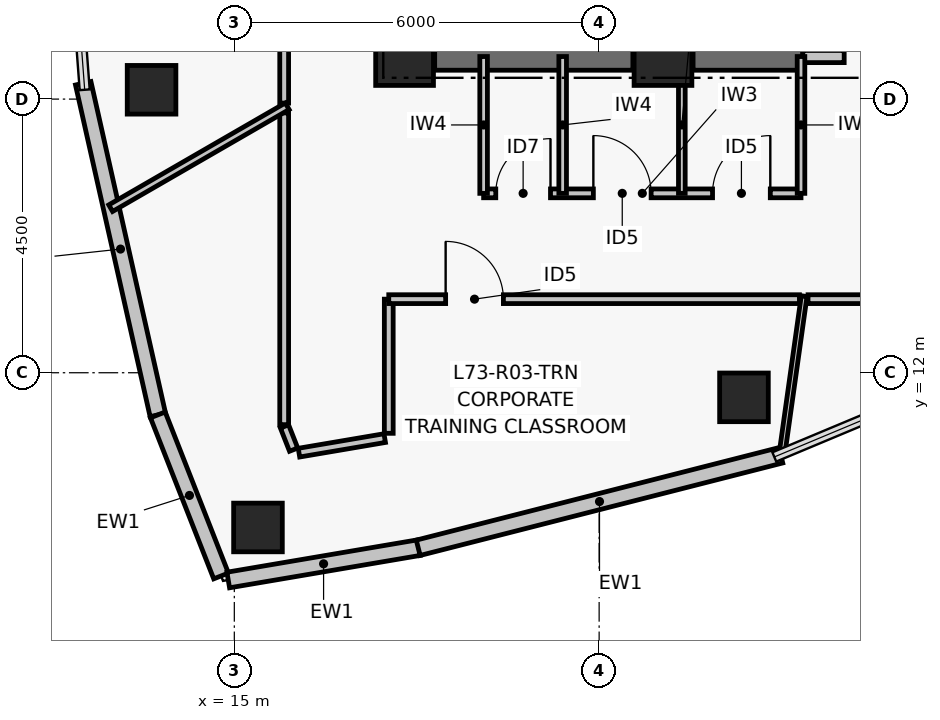
"""IFC4 building model, lengths in metres.
Left out: names, types, materials, properties, quantities, classifications, styles, units other than length and angle.
Written with IfcOpenShell. Run it as: python <this file> out.ifc"""

import sys

from ifc_helpers import new_model, si_unit, direction, frame, frame_2d, origin, origin_2d, place, context, subcontext, project, spatial, rectangle, hollow_rectangle, extrude, element, fill, save


model = new_model("IFC4")
c1 = context("Model", 3, precision=1e-05, world=origin(), true_north=direction((0.0, 1.0)))
c2 = subcontext(c1, "Body", "Model", "MODEL_VIEW")
j1 = project(units=[si_unit("LENGTHUNIT", "METRE"), si_unit("PLANEANGLEUNIT", "RADIAN")], contexts=[c1])
p1 = place(None, origin())
s1 = spatial("IfcSite", under=j1, at=p1, CompositionType="ELEMENT")
p2 = place(p1, origin())
s2 = spatial("IfcBuilding", under=s1, at=p2, CompositionType="ELEMENT")
p3 = place(p2, frame((0.0, 0.0, 288.06)))
s3 = spatial("IfcBuildingStorey", under=s2, at=p3, CompositionType="ELEMENT", Elevation=288.06)
for number, where, z_axis, x_axis in (
    (1, (17.8, 17.2, 0.0), (0.0, 0.0, 1.0), (1.0, 0.0, 0.0)),
    (2, (22.05, 17.2, 0.0), (0.0, 0.0, 1.0), (1.0, 0.0, 0.0)),
):
    element("IfcColumn", number, at=place(p3, frame(where, z_axis=z_axis, x_axis=x_axis)), inside=s3, PredefinedType="COLUMN", context=c2, shape_type="SweptSolid", body=[
        extrude(rectangle(XDim=0.95, YDim=0.95, at=origin_2d()), origin(), (0.0, 0.0, 1.0), 3.72),
    ])
p4 = place(p3, frame((18.295, 17.2, 0.0), z_axis=(0.0, 0.0, 1.0), x_axis=(1.0, 0.0, 0.0)))
e3 = element("IfcWall", 3, at=p4, inside=s3, PredefinedType="SHEAR", context=c2, shape_type="SweptSolid", body=[
    extrude(rectangle(XDim=3.26, YDim=0.45, at=frame_2d((1.63, 0.0))), origin(), (0.0, 0.0, 1.0), 3.5),
])
p5 = place(p3, frame((22.545, 17.2, 0.0), z_axis=(0.0, 0.0, 1.0), x_axis=(1.0, 0.0, 0.0)))
e4 = element("IfcWall", 4, at=p5, inside=s3, PredefinedType="SHEAR", context=c2, shape_type="SweptSolid", body=[
    extrude(rectangle(XDim=1.805, YDim=0.45, at=frame_2d((0.903, 0.0))), origin(), (0.0, 0.0, 1.0), 3.5),
])
for number, where, z_axis, x_axis in (
    (5, (13.639, 16.653, 0.0), (0.0, 0.0, 1.0), (1.0, 0.0, 0.0)),
    (6, (15.389, 9.455, 0.0), (0.0, 0.0, 1.0), (1.0, 0.0, 0.0)),
    (7, (23.382, 11.595, 0.0), (0.0, 0.0, 1.0), (1.0, 0.0, 0.0)),
):
    element("IfcColumn", number, at=place(p3, frame(where, z_axis=z_axis, x_axis=x_axis)), inside=s3, PredefinedType="COLUMN", context=c2, shape_type="SweptSolid", body=[
        extrude(hollow_rectangle(XDim=0.8, YDim=0.8, WallThickness=0.035, at=origin_2d()), origin(), (0.0, 0.0, 1.0), 3.72),
    ])
p6 = place(p3, frame((13.742, 11.307, 0.0), z_axis=(0.0, 0.0, 1.0), x_axis=(-0.219500763731, 0.97561232809, 0.0)))
e8 = element("IfcWall", 8, at=p6, inside=s3, PredefinedType="PARTITIONING", context=c2, shape_type="SweptSolid", body=[
    extrude(rectangle(XDim=5.59, YDim=0.26, at=frame_2d((2.795, 0.0))), origin(), (0.0, 0.0, 1.0), 3.5),
])
p7 = place(p3, frame((14.782, 8.658, 0.0), z_axis=(0.0, 0.0, 1.0), x_axis=(-0.36559927932, 0.930772349697, 0.0)))
e9 = element("IfcWall", 9, at=p7, inside=s3, PredefinedType="PARTITIONING", context=c2, shape_type="SweptSolid", body=[
    extrude(rectangle(XDim=2.845, YDim=0.26, at=frame_2d((1.423, 0.0))), origin(), (0.0, 0.0, 1.0), 3.5),
])
p8 = place(p3, frame((18.036, 9.124, 0.0), z_axis=(0.0, 0.0, 1.0), x_axis=(-0.985889432766, -0.167397808709, 0.0)))
e10 = element("IfcWall", 10, at=p8, inside=s3, PredefinedType="PARTITIONING", context=c2, shape_type="SweptSolid", body=[
    extrude(rectangle(XDim=3.181, YDim=0.26, at=frame_2d((1.59, 0.0))), origin(), (0.0, 0.0, 1.0), 3.5),
])
p9 = place(p3, frame((23.988, 10.642, 0.0), z_axis=(0.0, 0.0, 1.0), x_axis=(-0.968988278672, -0.247106689096, 0.0)))
e11 = element("IfcWall", 11, at=p9, inside=s3, PredefinedType="PARTITIONING", context=c2, shape_type="SweptSolid", body=[
    extrude(rectangle(XDim=6.154, YDim=0.26, at=frame_2d((3.077, 0.0))), origin(), (0.0, 0.0, 1.0), 3.5),
])
p10 = place(p3, frame((24.35, 17.2, 0.0), z_axis=(0.0, 0.0, 1.0), x_axis=(1.0, 0.0, 0.0)))
e12 = element("IfcWall", 12, at=p10, inside=s3, PredefinedType="PARTITIONING", context=c2, shape_type="SweptSolid", body=[
    extrude(rectangle(XDim=2.5, YDim=0.2, at=frame_2d((1.25, 0.0))), origin(), (0.0, 0.0, 1.0), 2.63),
])
p11 = place(p10, frame((0.68, 0.0, 0.0)))
e13 = element("IfcOpeningElement", 13, at=p11, cuts=e12, PredefinedType="OPENING", context=c2, shape_type="SweptSolid", body=[
    extrude(rectangle(XDim=1.15, YDim=2.08, at=frame_2d((0.575, 1.04))), frame((0.0, 0.11, 0.0), z_axis=(0.0, -1.0, 0.0), x_axis=(1.0, 0.0, 0.0)), (0.0, 0.0, 1.0), 0.22),
])
p12 = place(p3, frame((19.1, 14.95, 0.0), z_axis=(0.0, 0.0, 1.0), x_axis=(1.0, 0.0, 0.0)))
e14 = element("IfcWall", 14, at=p12, inside=s3, PredefinedType="PARTITIONING", context=c2, shape_type="SweptSolid", body=[
    extrude(rectangle(XDim=5.22, YDim=0.145, at=frame_2d((2.61, 0.0))), origin(), (0.0, 0.0, 1.0), 2.83),
])
p13 = place(p12, frame((0.2, 0.0, 0.0)))
e15 = element("IfcOpeningElement", 15, at=p13, cuts=e14, PredefinedType="OPENING", context=c2, shape_type="SweptSolid", body=[
    extrude(rectangle(XDim=0.9, YDim=2.02, at=frame_2d((0.45, 1.01))), frame((0.0, 0.083, 0.0), z_axis=(0.0, -1.0, 0.0), x_axis=(1.0, 0.0, 0.0)), (0.0, 0.0, 1.0), 0.165),
])
p14 = place(p12, frame((1.805, 0.0, 0.0)))
e16 = element("IfcOpeningElement", 16, at=p14, cuts=e14, PredefinedType="OPENING", context=c2, shape_type="SweptSolid", body=[
    extrude(rectangle(XDim=0.95, YDim=2.06, at=frame_2d((0.475, 1.03))), frame((0.0, 0.083, 0.0), z_axis=(0.0, -1.0, 0.0), x_axis=(1.0, 0.0, 0.0)), (0.0, 0.0, 1.0), 0.165),
])
p15 = place(p12, frame((3.765, 0.0, 0.0)))
e17 = element("IfcOpeningElement", 17, at=p15, cuts=e14, PredefinedType="OPENING", context=c2, shape_type="SweptSolid", body=[
    extrude(rectangle(XDim=0.95, YDim=2.06, at=frame_2d((0.475, 1.03))), frame((0.0, 0.083, 0.0), z_axis=(0.0, -1.0, 0.0), x_axis=(1.0, 0.0, 0.0)), (0.0, 0.0, 1.0), 0.165),
])
for number, where, z_axis, x_axis in (
    (18, (19.1, 14.95, 0.0), (0.0, 0.0, 1.0), (0.0, 1.0, 0.0)),
    (19, (20.4, 14.95, 0.0), (0.0, 0.0, 1.0), (0.0, 1.0, 0.0)),
):
    element("IfcWall", number, at=place(p3, frame(where, z_axis=z_axis, x_axis=x_axis)), inside=s3, PredefinedType="PARTITIONING", context=c2, shape_type="SweptSolid", body=[
        extrude(rectangle(XDim=2.25, YDim=0.125, at=frame_2d((1.125, 0.0))), origin(), (0.0, 0.0, 1.0), 2.63),
    ])
p16 = place(p3, frame((22.36, 14.95, 0.0), z_axis=(0.0, 0.0, 1.0), x_axis=(0.0, 1.0, 0.0)))
e20 = element("IfcWall", 20, at=p16, inside=s3, PredefinedType="PARTITIONING", context=c2, shape_type="SweptSolid", body=[
    extrude(rectangle(XDim=2.25, YDim=0.11, at=frame_2d((1.125, 0.0))), origin(), (0.0, 0.0, 1.0), 2.63),
])
p17 = place(p3, frame((24.32, 14.95, 0.0), z_axis=(0.0, 0.0, 1.0), x_axis=(0.0, 1.0, 0.0)))
e21 = element("IfcWall", 21, at=p17, inside=s3, PredefinedType="PARTITIONING", context=c2, shape_type="SweptSolid", body=[
    extrude(rectangle(XDim=2.25, YDim=0.125, at=frame_2d((1.125, 0.0))), origin(), (0.0, 0.0, 1.0), 2.63),
])
p18 = place(p3, frame((15.82, 25.876, 0.0), z_axis=(0.0, 0.0, 1.0), x_axis=(0.0, -1.0, 0.0)))
e22 = element("IfcWall", 22, at=p18, inside=s3, PredefinedType="PARTITIONING", context=c2, shape_type="SweptSolid", body=[
    extrude(rectangle(XDim=9.442, YDim=0.145, at=frame_2d((4.721, 0.0))), origin(), (0.0, 0.0, 1.0), 2.83),
])
p19 = place(p18, frame((3.254, 0.0, 0.0)))
e23 = element("IfcOpeningElement", 23, at=p19, cuts=e22, PredefinedType="OPENING", context=c2, shape_type="SweptSolid", body=[
    extrude(rectangle(XDim=0.95, YDim=2.06, at=frame_2d((0.475, 1.03))), frame((0.0, 0.083, 0.0), z_axis=(0.0, -1.0, 0.0), x_axis=(1.0, 0.0, 0.0)), (0.0, 0.0, 1.0), 0.165),
])
p20 = place(p3, frame((15.82, 16.273, 0.0), z_axis=(0.0, 0.0, 1.0), x_axis=(0.0, -1.0, 0.0)))
e24 = element("IfcWall", 24, at=p20, inside=s3, PredefinedType="PARTITIONING", context=c2, shape_type="SweptSolid", body=[
    extrude(rectangle(XDim=5.126, YDim=0.145, at=frame_2d((2.563, 0.0))), origin(), (0.0, 0.0, 1.0), 2.83),
])
p21 = place(p3, frame((15.825, 11.117, 0.0), z_axis=(0.0, 0.0, 1.0), x_axis=(0.365633948196, -0.930758731319, 0.0)))
e25 = element("IfcWall", 25, at=p21, inside=s3, PredefinedType="PARTITIONING", context=c2, shape_type="SweptSolid", body=[
    extrude(rectangle(XDim=0.41, YDim=0.145, at=frame_2d((0.205, 0.0))), origin(), (0.0, 0.0, 1.0), 2.83),
])
p22 = place(p3, frame((16.063, 10.686, 0.0), z_axis=(0.0, 0.0, 1.0), x_axis=(0.985881780308, 0.167442871621, 0.0)))
e26 = element("IfcWall", 26, at=p22, inside=s3, PredefinedType="PARTITIONING", context=c2, shape_type="SweptSolid", body=[
    extrude(rectangle(XDim=1.43, YDim=0.145, at=frame_2d((0.715, 0.0))), origin(), (0.0, 0.0, 1.0), 3.13),
])
p23 = place(p3, frame((17.54, 11.004, 0.0), z_axis=(0.0, 0.0, 1.0), x_axis=(0.0, 1.0, 0.0)))
e27 = element("IfcWall", 27, at=p23, inside=s3, PredefinedType="PARTITIONING", context=c2, shape_type="SweptSolid", body=[
    extrude(rectangle(XDim=2.206, YDim=0.145, at=frame_2d((1.103, 0.0))), origin(), (0.0, 0.0, 1.0), 3.13),
])
p24 = place(p3, frame((17.54, 13.21, 0.0), z_axis=(0.0, 0.0, 1.0), x_axis=(1.0, 0.0, 0.0)))
e28 = element("IfcWall", 28, at=p24, inside=s3, PredefinedType="PARTITIONING", context=c2, shape_type="SweptSolid", body=[
    extrude(rectangle(XDim=6.754, YDim=0.145, at=frame_2d((3.377, 0.0))), origin(), (0.0, 0.0, 1.0), 2.83),
])
p25 = place(p24, frame((0.936, 0.0, 0.0)))
e29 = element("IfcOpeningElement", 29, at=p25, cuts=e28, PredefinedType="OPENING", context=c2, shape_type="SweptSolid", body=[
    extrude(rectangle(XDim=0.95, YDim=2.06, at=frame_2d((0.475, 1.03))), frame((0.0, 0.083, 0.0), z_axis=(0.0, -1.0, 0.0), x_axis=(1.0, 0.0, 0.0)), (0.0, 0.0, 1.0), 0.165),
])
p26 = place(p3, frame((24.435, 13.21, 0.0), z_axis=(0.0, 0.0, 1.0), x_axis=(1.0, 0.0, 0.0)))
e30 = element("IfcWall", 30, at=p26, inside=s3, PredefinedType="PARTITIONING", context=c2, shape_type="SweptSolid", body=[
    extrude(rectangle(XDim=4.675, YDim=0.145, at=frame_2d((2.337, 0.0))), origin(), (0.0, 0.0, 1.0), 2.98),
])
p27 = place(p26, frame((2.676, 0.0, 0.0)))
e31 = element("IfcOpeningElement", 31, at=p27, cuts=e30, PredefinedType="OPENING", context=c2, shape_type="SweptSolid", body=[
    extrude(rectangle(XDim=0.92, YDim=2.05, at=frame_2d((0.46, 1.025))), frame((0.0, 0.083, 0.0), z_axis=(0.0, -1.0, 0.0), x_axis=(1.0, 0.0, 0.0)), (0.0, 0.0, 1.0), 0.165),
])
p28 = place(p3, frame((15.87, 16.382, 0.0), z_axis=(0.0, 0.0, 1.0), x_axis=(-0.866052188221, -0.499953605124, 0.0)))
e32 = element("IfcWall", 32, at=p28, inside=s3, PredefinedType="PARTITIONING", context=c2, shape_type="SweptSolid", body=[
    extrude(rectangle(XDim=3.352, YDim=0.125, at=frame_2d((1.676, 0.0))), origin(), (0.0, 0.0, 1.0), 2.98),
])
p29 = place(p3, frame((24.372, 13.26, 0.0), z_axis=(0.0, 0.0, 1.0), x_axis=(-0.139185119823, -0.990266379526, 0.0)))
e33 = element("IfcWall", 33, at=p29, inside=s3, PredefinedType="PARTITIONING", context=c2, shape_type="SweptSolid", body=[
    extrude(rectangle(XDim=2.629, YDim=0.095, at=frame_2d((1.315, 0.0))), origin(), (0.0, 0.0, 1.0), 2.98),
])
p30 = place(p11, origin())
e34 = element("IfcDoor", 34, at=p30, inside=s3, OperationType="SINGLE_SWING_LEFT", PredefinedType="DOOR", context=c2, shape_type="SweptSolid", body=[
    extrude(rectangle(XDim=1.15, YDim=2.08, at=frame_2d((0.575, 1.04))), frame((0.0, 0.025, 0.0), z_axis=(0.0, -1.0, 0.0), x_axis=(1.0, 0.0, 0.0)), (0.0, 0.0, 1.0), 0.05),
])
fill(e13, e34)
p31 = place(p13, origin())
e35 = element("IfcDoor", 35, at=p31, inside=s3, OperationType="SINGLE_SWING_RIGHT", PredefinedType="DOOR", context=c2, shape_type="SweptSolid", body=[
    extrude(rectangle(XDim=0.9, YDim=2.02, at=frame_2d((0.45, 1.01))), frame((0.0, 0.025, 0.0), z_axis=(0.0, -1.0, 0.0), x_axis=(1.0, 0.0, 0.0)), (0.0, 0.0, 1.0), 0.05),
])
fill(e15, e35)
p32 = place(p14, origin())
e36 = element("IfcDoor", 36, at=p32, inside=s3, OperationType="SINGLE_SWING_LEFT", PredefinedType="DOOR", context=c2, shape_type="SweptSolid", body=[
    extrude(rectangle(XDim=0.95, YDim=2.06, at=frame_2d((0.475, 1.03))), frame((0.0, 0.025, 0.0), z_axis=(0.0, -1.0, 0.0), x_axis=(1.0, 0.0, 0.0)), (0.0, 0.0, 1.0), 0.05),
])
fill(e16, e36)
p33 = place(p15, origin())
e37 = element("IfcDoor", 37, at=p33, inside=s3, OperationType="SINGLE_SWING_RIGHT", PredefinedType="DOOR", context=c2, shape_type="SweptSolid", body=[
    extrude(rectangle(XDim=0.95, YDim=2.06, at=frame_2d((0.475, 1.03))), frame((0.0, 0.025, 0.0), z_axis=(0.0, -1.0, 0.0), x_axis=(1.0, 0.0, 0.0)), (0.0, 0.0, 1.0), 0.05),
])
fill(e17, e37)
p34 = place(p25, origin())
e38 = element("IfcDoor", 38, at=p34, inside=s3, OperationType="SINGLE_SWING_LEFT", PredefinedType="DOOR", context=c2, shape_type="SweptSolid", body=[
    extrude(rectangle(XDim=0.95, YDim=2.06, at=frame_2d((0.475, 1.03))), frame((0.0, 0.025, 0.0), z_axis=(0.0, -1.0, 0.0), x_axis=(1.0, 0.0, 0.0)), (0.0, 0.0, 1.0), 0.05),
])
fill(e29, e38)
save(model, sys.argv[1])
